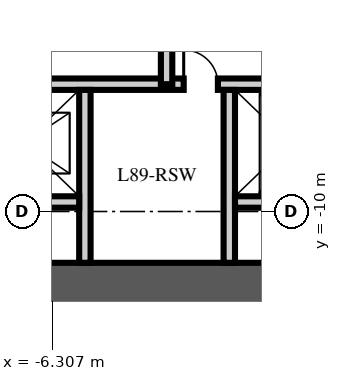
"""IFC4 building model, lengths in metres.
Left out: names, types, materials, properties, quantities, classifications, styles, units other than length and angle.
Written with IfcOpenShell. Run it as: python <this file> out.ifc"""

import sys

from ifc_helpers import new_model, si_unit, direction, frame, frame_2d, origin, place, context, subcontext, project, spatial, rectangle, extrude, element, fill, save


model = new_model("IFC4")
c1 = context("Model", 3, precision=1e-05, world=origin(), true_north=direction((0.0, 1.0)))
c2 = subcontext(c1, "Body", "Model", "MODEL_VIEW")
j1 = project(units=[si_unit("LENGTHUNIT", "METRE"), si_unit("PLANEANGLEUNIT", "RADIAN")], contexts=[c1])
p1 = place(None, origin())
s1 = spatial("IfcSite", under=j1, at=p1, CompositionType="ELEMENT")
p2 = place(p1, origin())
s2 = spatial("IfcBuilding", under=s1, at=p2, CompositionType="ELEMENT")
p3 = place(p2, frame((0.0, 0.0, 353.25)))
s3 = spatial("IfcBuildingStorey", under=s2, at=p3, CompositionType="ELEMENT", Elevation=353.25)
p4 = place(p3, frame((-15.5, -12.0, -0.3), z_axis=(0.0, 0.0, 1.0), x_axis=(1.0, 0.0, 0.0)))
e1 = element("IfcWall", 1, at=p4, inside=s3, PredefinedType="SHEAR", context=c2, shape_type="SweptSolid", body=[
    extrude(rectangle(XDim=31.0, YDim=1.3, at=frame_2d((15.5, 0.0))), origin(), (0.0, 0.0, 1.0), 5.0),
])
p5 = place(p3, frame((-8.5, -6.65, 0.0), z_axis=(0.0, 0.0, 1.0), x_axis=(1.0, 0.0, 0.0)))
e2 = element("IfcWall", 2, at=p5, inside=s3, PredefinedType="PARTITIONING", context=c2, shape_type="SweptSolid", body=[
    extrude(rectangle(XDim=17.0, YDim=0.3, at=frame_2d((8.5, 0.0))), origin(), (0.0, 0.0, 1.0), 4.7),
])
p6 = place(p5, frame((7.8, 0.0, 0.0)))
e3 = element("IfcOpeningElement", 3, at=p6, cuts=e2, PredefinedType="OPENING", context=c2, shape_type="SweptSolid", body=[
    extrude(rectangle(XDim=1.3, YDim=2.4, at=frame_2d((0.65, 1.2))), frame((0.0, 0.16, 0.0), z_axis=(0.0, -1.0, 0.0), x_axis=(1.0, 0.0, 0.0)), (0.0, 0.0, 1.0), 0.32),
])
p7 = place(p5, frame((5.65, 0.0, 0.0)))
e4 = element("IfcOpeningElement", 4, at=p7, cuts=e2, PredefinedType="OPENING", context=c2, shape_type="SweptSolid", body=[
    extrude(rectangle(XDim=0.9, YDim=2.1, at=frame_2d((0.45, 1.05))), frame((0.0, 0.16, 0.0), z_axis=(0.0, -1.0, 0.0), x_axis=(1.0, 0.0, 0.0)), (0.0, 0.0, 1.0), 0.32),
])
p8 = place(p5, frame((10.4, 0.0, 0.0)))
e5 = element("IfcOpeningElement", 5, at=p8, cuts=e2, PredefinedType="OPENING", context=c2, shape_type="SweptSolid", body=[
    extrude(rectangle(XDim=0.9, YDim=2.1, at=frame_2d((0.45, 1.05))), frame((0.0, 0.16, 0.0), z_axis=(0.0, -1.0, 0.0), x_axis=(1.0, 0.0, 0.0)), (0.0, 0.0, 1.0), 0.32),
])
for number, where, z_axis, x_axis in (
    (6, (-5.45, -11.35, 0.0), (0.0, 0.0, 1.0), (0.0, 1.0, 0.0)),
    (7, (-1.65, -11.35, 0.0), (0.0, 0.0, 1.0), (0.0, 1.0, 0.0)),
):
    element("IfcWall", number, at=place(p3, frame(where, z_axis=z_axis, x_axis=x_axis)), inside=s3, PredefinedType="PARTITIONING", context=c2, shape_type="SweptSolid", body=[
        extrude(rectangle(XDim=4.55, YDim=0.3, at=frame_2d((2.275, 0.0))), origin(), (0.0, 0.0, 1.0), 4.7),
    ])
for number, where, z_axis, x_axis in (
    (8, (-8.5, -9.75, 0.0), (0.0, 0.0, 1.0), (1.0, 0.0, 0.0)),
    (9, (-1.5, -9.75, 0.0), (0.0, 0.0, 1.0), (1.0, 0.0, 0.0)),
):
    element("IfcWall", number, at=place(p3, frame(where, z_axis=z_axis, x_axis=x_axis)), inside=s3, PredefinedType="PARTITIONING", context=c2, shape_type="SweptSolid", body=[
        extrude(rectangle(XDim=2.9, YDim=0.3, at=frame_2d((1.45, 0.0))), origin(), (0.0, 0.0, 1.0), 4.7),
    ])
p9 = place(p3, frame((-3.3, -6.65, 0.0), z_axis=(0.0, 0.0, 1.0), x_axis=(0.0, 1.0, 0.0)))
e10 = element("IfcWall", 10, at=p9, inside=s3, PredefinedType="PARTITIONING", context=c2, shape_type="SweptSolid", body=[
    extrude(rectangle(XDim=8.65, YDim=0.3, at=frame_2d((4.325, 0.0))), origin(), (0.0, 0.0, 1.0), 4.7),
])
p10 = place(p9, frame((1.75, 0.0, 0.0)))
e11 = element("IfcOpeningElement", 11, at=p10, cuts=e10, PredefinedType="OPENING", context=c2, shape_type="SweptSolid", body=[
    extrude(rectangle(XDim=0.9, YDim=2.1, at=frame_2d((0.45, 1.05))), frame((0.0, 0.16, 0.0), z_axis=(0.0, -1.0, 0.0), x_axis=(1.0, 0.0, 0.0)), (0.0, 0.0, 1.0), 0.32),
])
p11 = place(p9, frame((6.075, 0.0, 0.0)))
e12 = element("IfcOpeningElement", 12, at=p11, cuts=e10, PredefinedType="OPENING", context=c2, shape_type="SweptSolid", body=[
    extrude(rectangle(XDim=0.9, YDim=2.1, at=frame_2d((0.45, 1.05))), frame((0.0, 0.16, 0.0), z_axis=(0.0, -1.0, 0.0), x_axis=(1.0, 0.0, 0.0)), (0.0, 0.0, 1.0), 0.32),
])
p12 = place(p7, origin())
e13 = element("IfcDoor", 13, at=p12, inside=s3, OperationType="SINGLE_SWING_LEFT", PredefinedType="DOOR", context=c2, shape_type="SweptSolid", body=[
    extrude(rectangle(XDim=0.9, YDim=2.1, at=frame_2d((0.45, 1.05))), frame((0.0, 0.025, 0.0), z_axis=(0.0, -1.0, 0.0), x_axis=(1.0, 0.0, 0.0)), (0.0, 0.0, 1.0), 0.05),
])
fill(e4, e13)
save(model, sys.argv[1])
